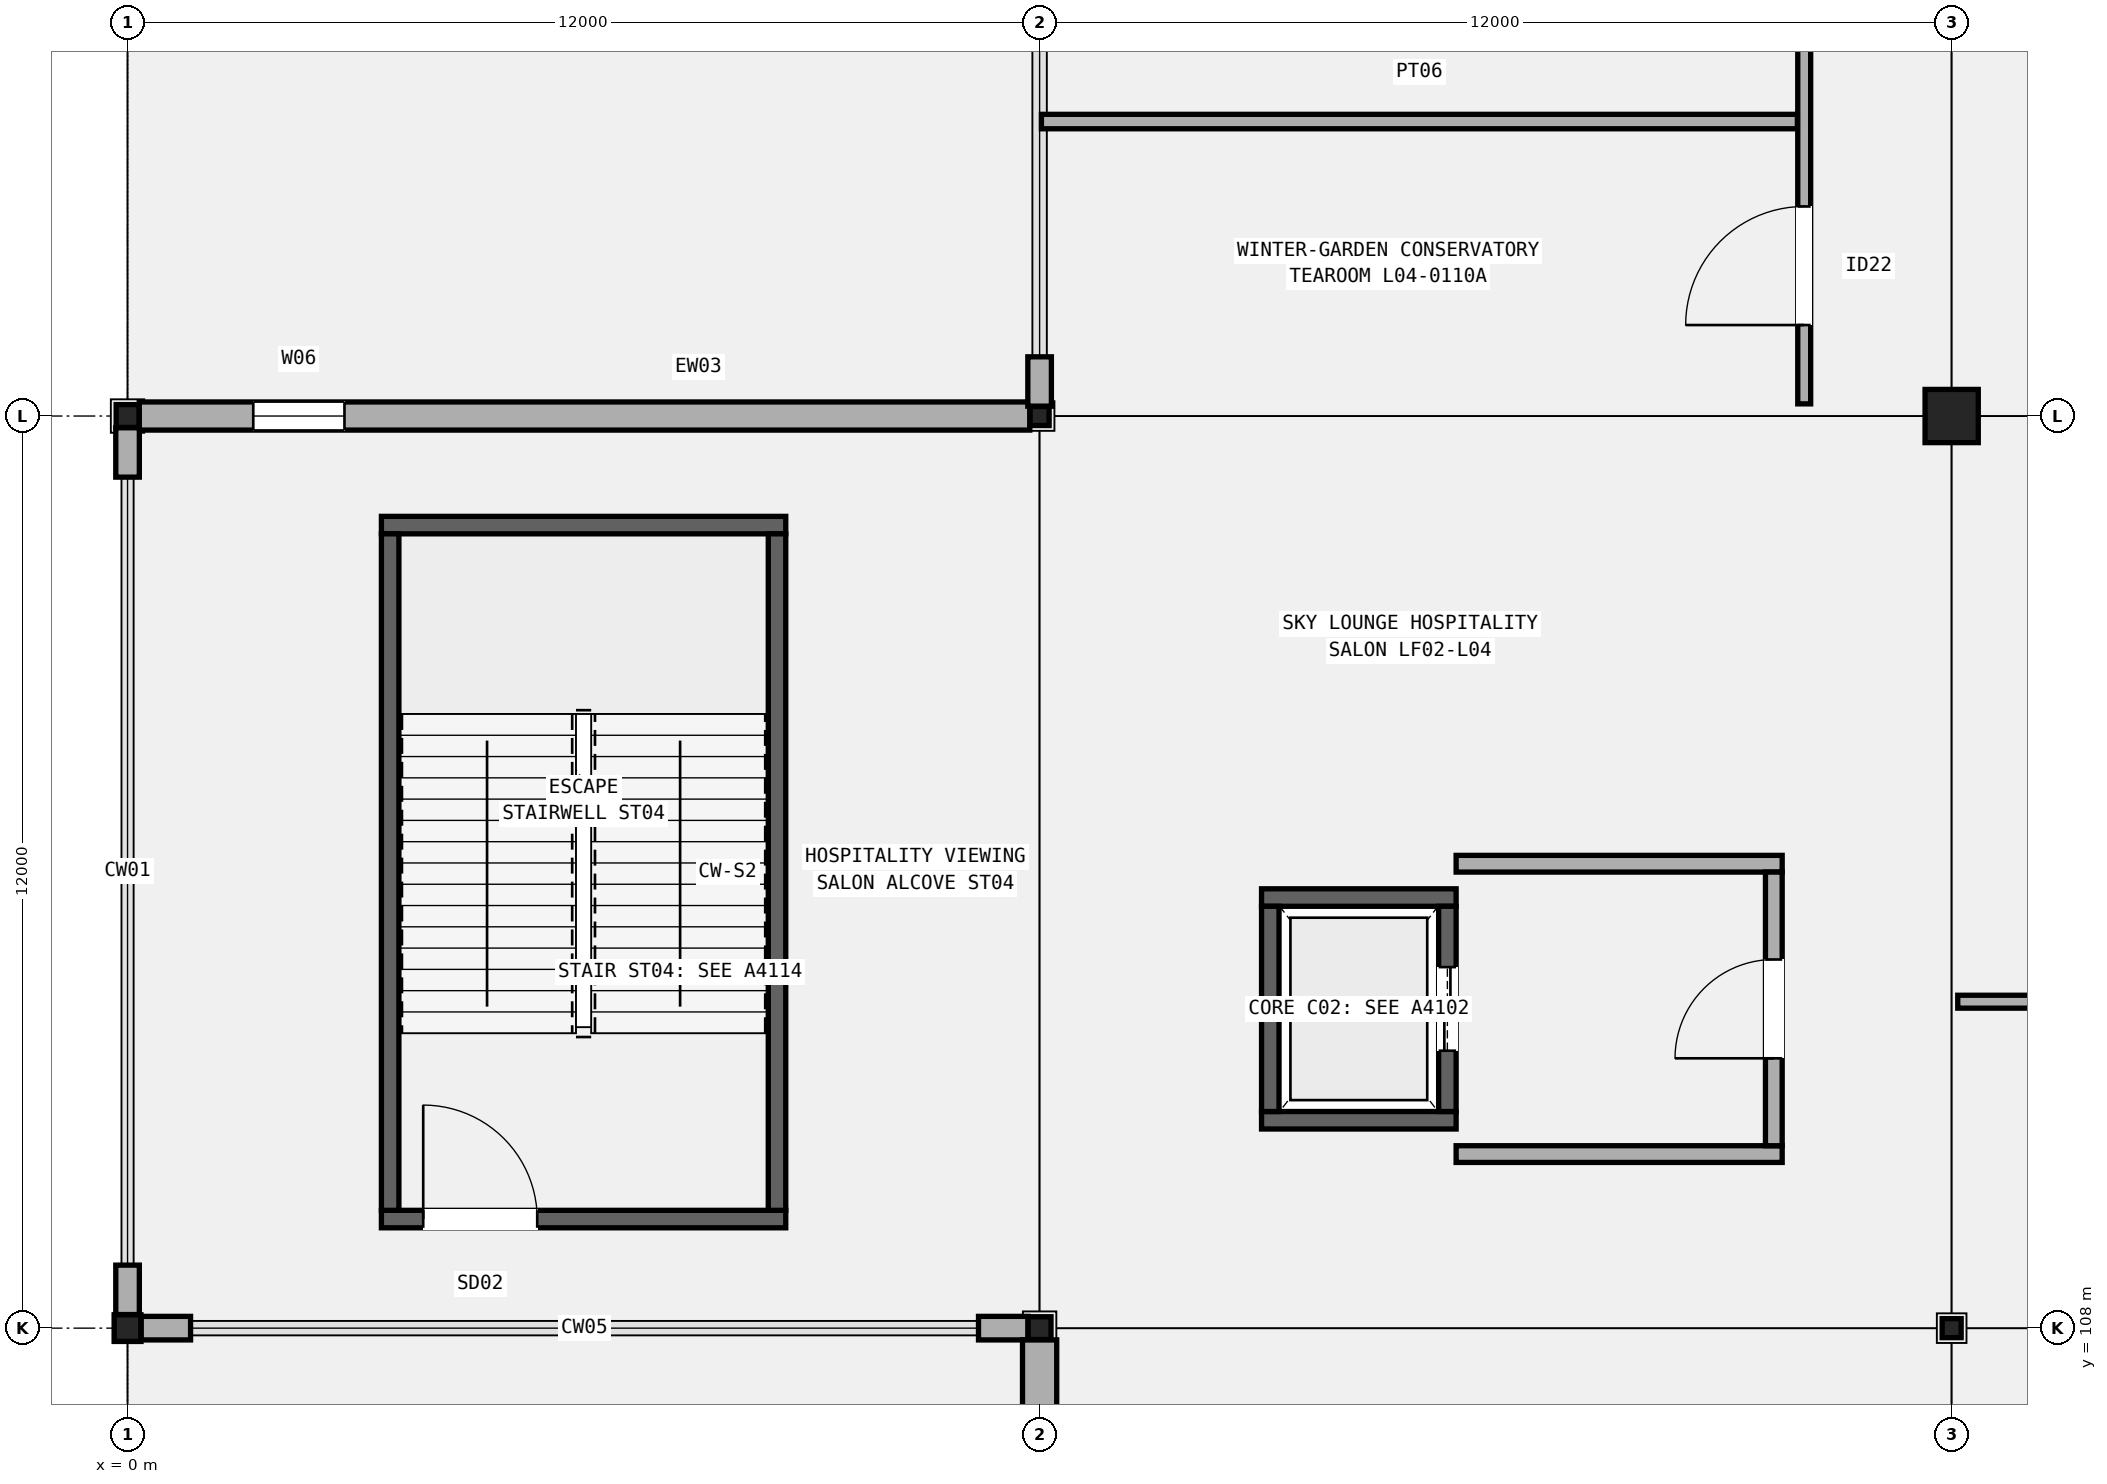
"""IFC4 building model, lengths in metres.
Left out: names, types, materials, properties, quantities, classifications, styles, units other than length and angle.
Written with IfcOpenShell. Run it as: python <this file> out.ifc"""

import sys

from ifc_helpers import new_model, si_unit, direction, frame, frame_2d, origin, origin_2d, place, context, subcontext, project, spatial, rectangle, hollow_rectangle, extrude, element, fill, save


model = new_model("IFC4")
c1 = context("Model", 3, precision=1e-05, world=origin(), true_north=direction((0.0, 1.0)))
c2 = subcontext(c1, "Body", "Model", "MODEL_VIEW")
j1 = project(units=[si_unit("LENGTHUNIT", "METRE"), si_unit("PLANEANGLEUNIT", "RADIAN")], contexts=[c1])
p1 = place(None, origin())
s1 = spatial("IfcSite", under=j1, at=p1, CompositionType="ELEMENT")
p2 = place(p1, origin())
s2 = spatial("IfcBuilding", under=s1, at=p2, CompositionType="ELEMENT")
p3 = place(p2, frame((0.0, 0.0, 20.4)))
s3 = spatial("IfcBuildingStorey", under=s2, at=p3, CompositionType="ELEMENT", Elevation=20.4)
p4 = place(p3, frame((0.0, 108.0, 0.0), z_axis=(0.0, 0.0, 1.0), x_axis=(1.0, 0.0, 0.0)))
e1 = element("IfcColumn", 1, at=p4, inside=s3, PredefinedType="COLUMN", context=c2, shape_type="SweptSolid", body=[
    extrude(hollow_rectangle(XDim=0.35, YDim=0.35, WallThickness=0.016, InnerFilletRadius=0.016, OuterFilletRadius=0.032, at=origin_2d()), origin(), (0.0, 0.0, 1.0), 5.4),
])
for number, where, z_axis, x_axis in (
    (2, (0.0, 120.0, 0.0), (0.0, 0.0, 1.0), (1.0, 0.0, 0.0)),
    (3, (12.0, 108.0, 0.0), (0.0, 0.0, 1.0), (1.0, 0.0, 0.0)),
):
    element("IfcColumn", number, at=place(p3, frame(where, z_axis=z_axis, x_axis=x_axis)), inside=s3, PredefinedType="COLUMN", context=c2, shape_type="SweptSolid", body=[
        extrude(hollow_rectangle(XDim=0.3, YDim=0.3, WallThickness=0.012, InnerFilletRadius=0.012, OuterFilletRadius=0.024, at=origin_2d()), origin(), (0.0, 0.0, 1.0), 5.4),
    ])
for number, where, z_axis, x_axis in (
    (4, (12.0, 120.0, 0.0), (0.0, 0.0, 1.0), (1.0, 0.0, 0.0)),
    (5, (24.0, 108.0, 0.0), (0.0, 0.0, 1.0), (1.0, 0.0, 0.0)),
):
    element("IfcColumn", number, at=place(p3, frame(where, z_axis=z_axis, x_axis=x_axis)), inside=s3, PredefinedType="COLUMN", context=c2, shape_type="SweptSolid", body=[
        extrude(hollow_rectangle(XDim=0.25, YDim=0.25, WallThickness=0.012, InnerFilletRadius=0.012, OuterFilletRadius=0.024, at=origin_2d()), origin(), (0.0, 0.0, 1.0), 5.4),
    ])
p5 = place(p3, frame((24.0, 120.0, 0.0), z_axis=(0.0, 0.0, 1.0), x_axis=(1.0, 0.0, 0.0)))
e6 = element("IfcColumn", 6, at=p5, inside=s3, PredefinedType="COLUMN", context=c2, shape_type="SweptSolid", body=[
    extrude(rectangle(XDim=0.7, YDim=0.7, at=origin_2d()), origin(), (0.0, 0.0, 1.0), 5.4),
])
p6 = place(p3, frame((0.179, 108.0, 0.0), z_axis=(0.0, 0.0, 1.0), x_axis=(1.0, 0.0, 0.0)))
e7 = element("IfcWall", 7, at=p6, inside=s3, PredefinedType="SOLIDWALL", context=c2, shape_type="SweptSolid", body=[
    extrude(rectangle(XDim=0.65, YDim=0.31, at=frame_2d((0.325, 0.0))), origin(), (0.0, 0.0, 1.0), 4.48),
])
p7 = place(p3, frame((11.196, 108.0, 0.0), z_axis=(0.0, 0.0, 1.0), x_axis=(1.0, 0.0, 0.0)))
e8 = element("IfcWall", 8, at=p7, inside=s3, PredefinedType="SOLIDWALL", context=c2, shape_type="SweptSolid", body=[
    extrude(rectangle(XDim=0.65, YDim=0.31, at=frame_2d((0.325, 0.0))), origin(), (0.0, 0.0, 1.0), 4.48),
])
p8 = place(p3, frame((0.154, 120.0, 0.0), z_axis=(0.0, 0.0, 1.0), x_axis=(1.0, 0.0, 0.0)))
e9 = element("IfcWall", 9, at=p8, inside=s3, PredefinedType="SOLIDWALL", context=c2, shape_type="SweptSolid", body=[
    extrude(rectangle(XDim=11.717, YDim=0.37, at=frame_2d((5.858, 0.0))), origin(), (0.0, 0.0, 1.0), 4.58),
])
p9 = place(p8, frame((1.5, 0.0, 0.95)))
e10 = element("IfcOpeningElement", 10, at=p9, cuts=e9, PredefinedType="OPENING", context=c2, shape_type="SweptSolid", body=[
    extrude(rectangle(XDim=1.2, YDim=2.3, at=frame_2d((0.6, 1.15))), frame((0.0, 0.195, 0.0), z_axis=(0.0, -1.0, 0.0), x_axis=(1.0, 0.0, 0.0)), (0.0, 0.0, 1.0), 0.39),
])
p10 = place(p3, frame((0.0, 108.179, 0.0), z_axis=(0.0, 0.0, 1.0), x_axis=(0.0, 1.0, 0.0)))
e11 = element("IfcWall", 11, at=p10, inside=s3, PredefinedType="SOLIDWALL", context=c2, shape_type="SweptSolid", body=[
    extrude(rectangle(XDim=0.65, YDim=0.31, at=frame_2d((0.325, 0.0))), origin(), (0.0, 0.0, 1.0), 4.48),
])
p11 = place(p3, frame((0.0, 119.196, 0.0), z_axis=(0.0, 0.0, 1.0), x_axis=(0.0, 1.0, 0.0)))
e12 = element("IfcWall", 12, at=p11, inside=s3, PredefinedType="SOLIDWALL", context=c2, shape_type="SweptSolid", body=[
    extrude(rectangle(XDim=0.65, YDim=0.31, at=frame_2d((0.325, 0.0))), origin(), (0.0, 0.0, 1.0), 4.48),
])
p12 = place(p3, frame((12.0, 96.179, 0.0), z_axis=(0.0, 0.0, 1.0), x_axis=(0.0, 1.0, 0.0)))
e13 = element("IfcWall", 13, at=p12, inside=s3, PredefinedType="SOLIDWALL", context=c2, shape_type="SweptSolid", body=[
    extrude(rectangle(XDim=11.667, YDim=0.45, at=frame_2d((5.833, 0.0))), origin(), (0.0, 0.0, 1.0), 4.48),
])
p13 = place(p12, frame((1.5, 0.0, 0.95)))
e14 = element("IfcOpeningElement", 14, at=p13, cuts=e13, PredefinedType="OPENING", context=c2, shape_type="SweptSolid", body=[
    extrude(rectangle(XDim=1.65, YDim=2.45, at=frame_2d((0.825, 1.225))), frame((0.0, 0.235, 0.0), z_axis=(0.0, -1.0, 0.0), x_axis=(1.0, 0.0, 0.0)), (0.0, 0.0, 1.0), 0.47),
])
p14 = place(p3, frame((12.0, 120.129, 0.0), z_axis=(0.0, 0.0, 1.0), x_axis=(0.0, 1.0, 0.0)))
e15 = element("IfcWall", 15, at=p14, inside=s3, PredefinedType="SOLIDWALL", context=c2, shape_type="SweptSolid", body=[
    extrude(rectangle(XDim=0.65, YDim=0.31, at=frame_2d((0.325, 0.0))), origin(), (0.0, 0.0, 1.0), 4.592),
])
p15 = place(p3, frame((3.34, 109.435, 0.0), z_axis=(0.0, 0.0, 1.0), x_axis=(1.0, 0.0, 0.0)))
e16 = element("IfcWall", 16, at=p15, inside=s3, PredefinedType="SHEAR", context=c2, shape_type="SweptSolid", body=[
    extrude(rectangle(XDim=5.32, YDim=0.23, at=frame_2d((2.66, 0.0))), origin(), (0.0, 0.0, 1.0), 5.18),
])
p16 = place(p15, frame((0.55, 0.0, 0.0)))
e17 = element("IfcOpeningElement", 17, at=p16, cuts=e16, PredefinedType="OPENING", context=c2, shape_type="SweptSolid", body=[
    extrude(rectangle(XDim=1.5, YDim=2.2, at=frame_2d((0.75, 1.1))), frame((0.0, 0.125, 0.0), z_axis=(0.0, -1.0, 0.0), x_axis=(1.0, 0.0, 0.0)), (0.0, 0.0, 1.0), 0.25),
])
p17 = place(p3, frame((3.34, 118.565, 0.0), z_axis=(0.0, 0.0, 1.0), x_axis=(1.0, 0.0, 0.0)))
e18 = element("IfcWall", 18, at=p17, inside=s3, PredefinedType="SHEAR", context=c2, shape_type="SweptSolid", body=[
    extrude(rectangle(XDim=5.32, YDim=0.23, at=frame_2d((2.66, 0.0))), origin(), (0.0, 0.0, 1.0), 5.18),
])
for number, where, z_axis, x_axis in (
    (19, (3.455, 109.55, 0.0), (0.0, 0.0, 1.0), (0.0, 1.0, 0.0)),
    (20, (8.545, 109.55, 0.0), (0.0, 0.0, 1.0), (0.0, 1.0, 0.0)),
):
    element("IfcWall", number, at=place(p3, frame(where, z_axis=z_axis, x_axis=x_axis)), inside=s3, PredefinedType="SHEAR", context=c2, shape_type="SweptSolid", body=[
        extrude(rectangle(XDim=8.9, YDim=0.23, at=frame_2d((4.45, 0.0))), origin(), (0.0, 0.0, 1.0), 5.18),
    ])
for number, where, z_axis, x_axis in (
    (21, (14.92, 110.735, 0.0), (0.0, 0.0, 1.0), (1.0, 0.0, 0.0)),
    (22, (14.92, 113.665, 0.0), (0.0, 0.0, 1.0), (1.0, 0.0, 0.0)),
):
    element("IfcWall", number, at=place(p3, frame(where, z_axis=z_axis, x_axis=x_axis)), inside=s3, PredefinedType="SHEAR", context=c2, shape_type="SweptSolid", body=[
        extrude(rectangle(XDim=2.56, YDim=0.23, at=frame_2d((1.28, 0.0))), origin(), (0.0, 0.0, 1.0), 5.18),
    ])
p18 = place(p3, frame((15.035, 110.85, 0.0), z_axis=(0.0, 0.0, 1.0), x_axis=(0.0, 1.0, 0.0)))
e23 = element("IfcWall", 23, at=p18, inside=s3, PredefinedType="SHEAR", context=c2, shape_type="SweptSolid", body=[
    extrude(rectangle(XDim=2.7, YDim=0.23, at=frame_2d((1.35, 0.0))), origin(), (0.0, 0.0, 1.0), 5.18),
])
p19 = place(p3, frame((17.365, 110.85, 0.0), z_axis=(0.0, 0.0, 1.0), x_axis=(0.0, 1.0, 0.0)))
e24 = element("IfcWall", 24, at=p19, inside=s3, PredefinedType="SHEAR", context=c2, shape_type="SweptSolid", body=[
    extrude(rectangle(XDim=2.7, YDim=0.23, at=frame_2d((1.35, 0.0))), origin(), (0.0, 0.0, 1.0), 5.18),
])
p20 = place(p19, frame((0.8, 0.0, 0.0)))
e25 = element("IfcOpeningElement", 25, at=p20, cuts=e24, PredefinedType="OPENING", context=c2, shape_type="SweptSolid", body=[
    extrude(rectangle(XDim=1.1, YDim=2.15, at=frame_2d((0.55, 1.075))), frame((0.0, 0.125, 0.0), z_axis=(0.0, -1.0, 0.0), x_axis=(1.0, 0.0, 0.0)), (0.0, 0.0, 1.0), 0.25),
])
for number, where, z_axis, x_axis in (
    (26, (17.48, 110.29, 0.0), (0.0, 0.0, 1.0), (1.0, 0.0, 0.0)),
    (27, (17.48, 114.11, 0.0), (0.0, 0.0, 1.0), (1.0, 0.0, 0.0)),
):
    element("IfcWall", number, at=place(p3, frame(where, z_axis=z_axis, x_axis=x_axis)), inside=s3, PredefinedType="SOLIDWALL", context=c2, shape_type="SweptSolid", body=[
        extrude(rectangle(XDim=4.29, YDim=0.22, at=frame_2d((2.145, 0.0))), origin(), (0.0, 0.0, 1.0), 4.52),
    ])
p21 = place(p3, frame((21.66, 110.4, 0.0), z_axis=(0.0, 0.0, 1.0), x_axis=(0.0, 1.0, 0.0)))
e28 = element("IfcWall", 28, at=p21, inside=s3, PredefinedType="SOLIDWALL", context=c2, shape_type="SweptSolid", body=[
    extrude(rectangle(XDim=3.6, YDim=0.22, at=frame_2d((1.8, 0.0))), origin(), (0.0, 0.0, 1.0), 4.52),
])
p22 = place(p21, frame((1.15, 0.0, 0.0)))
e29 = element("IfcOpeningElement", 29, at=p22, cuts=e28, PredefinedType="OPENING", context=c2, shape_type="SweptSolid", body=[
    extrude(rectangle(XDim=1.3, YDim=2.15, at=frame_2d((0.65, 1.075))), frame((0.0, 0.12, 0.0), z_axis=(0.0, -1.0, 0.0), x_axis=(1.0, 0.0, 0.0)), (0.0, 0.0, 1.0), 0.24),
])
p23 = place(p3, frame((22.06, 120.16, 0.0), z_axis=(0.0, 0.0, 1.0), x_axis=(0.0, 1.0, 0.0)))
e30 = element("IfcWall", 30, at=p23, inside=s3, PredefinedType="PARTITIONING", context=c2, shape_type="SweptSolid", body=[
    extrude(rectangle(XDim=11.68, YDim=0.17, at=frame_2d((5.84, 0.0))), origin(), (0.0, 0.0, 1.0), 4.52),
])
p24 = place(p23, frame((1.037, 0.0, 0.0)))
e31 = element("IfcOpeningElement", 31, at=p24, cuts=e30, PredefinedType="OPENING", context=c2, shape_type="SweptSolid", body=[
    extrude(rectangle(XDim=1.56, YDim=2.26, at=frame_2d((0.78, 1.13))), frame((0.0, 0.095, 0.0), z_axis=(0.0, -1.0, 0.0), x_axis=(1.0, 0.0, 0.0)), (0.0, 0.0, 1.0), 0.19),
])
p25 = place(p23, frame((6.937, 0.0, 0.0)))
e32 = element("IfcOpeningElement", 32, at=p25, cuts=e30, PredefinedType="OPENING", context=c2, shape_type="SweptSolid", body=[
    extrude(rectangle(XDim=1.6, YDim=2.3, at=frame_2d((0.8, 1.15))), frame((0.0, 0.095, 0.0), z_axis=(0.0, -1.0, 0.0), x_axis=(1.0, 0.0, 0.0)), (0.0, 0.0, 1.0), 0.19),
])
p26 = place(p3, frame((12.024, 123.874, 0.0), z_axis=(0.0, 0.0, 1.0), x_axis=(1.0, 0.0, 0.0)))
e33 = element("IfcWall", 33, at=p26, inside=s3, PredefinedType="PARTITIONING", context=c2, shape_type="SweptSolid", body=[
    extrude(rectangle(XDim=9.946, YDim=0.19, at=frame_2d((4.973, 0.0))), origin(), (0.0, 0.0, 1.0), 4.52),
])
p27 = place(p3, frame((24.08, 112.295, 0.0), z_axis=(0.0, 0.0, 1.0), x_axis=(1.0, 0.0, 0.0)))
e34 = element("IfcWall", 34, at=p27, inside=s3, PredefinedType="PARTITIONING", context=c2, shape_type="SweptSolid", body=[
    extrude(rectangle(XDim=10.4, YDim=0.17, at=frame_2d((5.2, 0.0))), origin(), (0.0, 0.0, 1.0), 4.52),
])
p28 = place(p9, origin())
e35 = element("IfcWindow", 35, at=p28, inside=s3, PartitioningType="SINGLE_PANEL", PredefinedType="WINDOW", context=c2, shape_type="SweptSolid", body=[
    extrude(rectangle(XDim=1.2, YDim=2.3, at=frame_2d((0.6, 1.15))), frame((0.0, 0.03, 0.0), z_axis=(0.0, -1.0, 0.0), x_axis=(1.0, 0.0, 0.0)), (0.0, 0.0, 1.0), 0.06),
])
fill(e10, e35)
p29 = place(p16, origin())
e36 = element("IfcDoor", 36, at=p29, inside=s3, OperationType="SINGLE_SWING_LEFT", PredefinedType="DOOR", context=c2, shape_type="SweptSolid", body=[
    extrude(rectangle(XDim=1.5, YDim=2.2, at=frame_2d((0.75, 1.1))), frame((0.0, 0.025, 0.0), z_axis=(0.0, -1.0, 0.0), x_axis=(1.0, 0.0, 0.0)), (0.0, 0.0, 1.0), 0.05),
])
fill(e17, e36)
p30 = place(p20, origin())
e37 = element("IfcDoor", 37, at=p30, inside=s3, OperationType="DOUBLE_DOOR_SLIDING", PredefinedType="DOOR", context=c2, shape_type="SweptSolid", body=[
    extrude(rectangle(XDim=1.1, YDim=2.15, at=frame_2d((0.55, 1.075))), frame((0.0, 0.025, 0.0), z_axis=(0.0, -1.0, 0.0), x_axis=(1.0, 0.0, 0.0)), (0.0, 0.0, 1.0), 0.05),
])
fill(e25, e37)
p31 = place(p22, origin())
e38 = element("IfcDoor", 38, at=p31, inside=s3, OperationType="SINGLE_SWING_LEFT", PredefinedType="DOOR", context=c2, shape_type="SweptSolid", body=[
    extrude(rectangle(XDim=1.3, YDim=2.15, at=frame_2d((0.65, 1.075))), frame((0.0, 0.025, 0.0), z_axis=(0.0, -1.0, 0.0), x_axis=(1.0, 0.0, 0.0)), (0.0, 0.0, 1.0), 0.05),
])
fill(e29, e38)
p32 = place(p24, origin())
e39 = element("IfcDoor", 39, at=p32, inside=s3, OperationType="SINGLE_SWING_LEFT", PredefinedType="DOOR", context=c2, shape_type="SweptSolid", body=[
    extrude(rectangle(XDim=1.56, YDim=2.26, at=frame_2d((0.78, 1.13))), frame((0.0, 0.025, 0.0), z_axis=(0.0, -1.0, 0.0), x_axis=(1.0, 0.0, 0.0)), (0.0, 0.0, 1.0), 0.05),
])
fill(e31, e39)
save(model, sys.argv[1])
